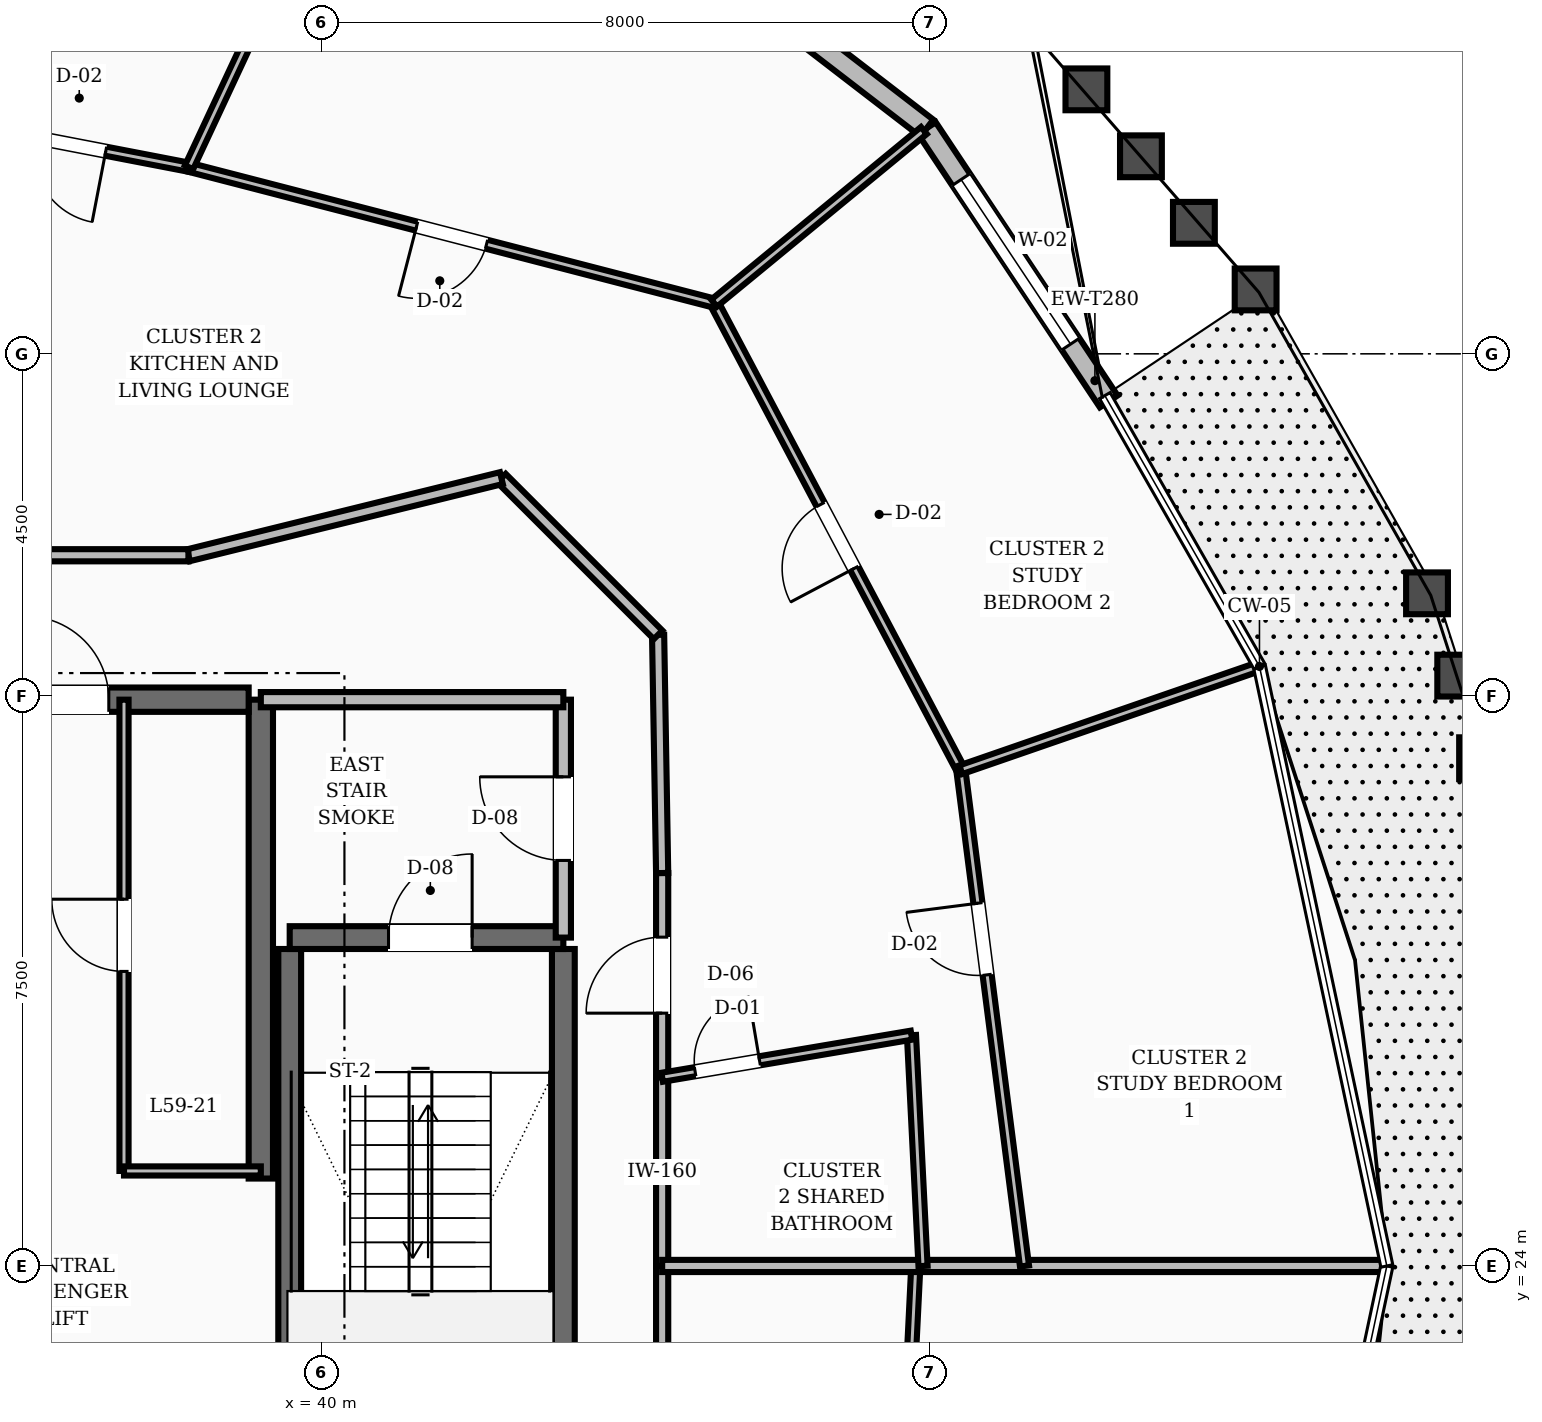
"""IFC4 building model, lengths in metres.
Left out: names, types, materials, properties, quantities, classifications, styles, units other than length and angle.
Written with IfcOpenShell. Run it as: python <this file> out.ifc"""

import sys

from ifc_helpers import new_model, si_unit, direction, frame, frame_2d, origin, place, context, subcontext, project, spatial, rectangle, extrude, element, fill, save


model = new_model("IFC4")
c1 = context("Model", 3, precision=1e-05, world=origin(), true_north=direction((0.0, 1.0)))
c2 = subcontext(c1, "Body", "Model", "MODEL_VIEW")
j1 = project(units=[si_unit("LENGTHUNIT", "METRE"), si_unit("PLANEANGLEUNIT", "RADIAN")], contexts=[c1])
p1 = place(None, origin())
s1 = spatial("IfcSite", under=j1, at=p1, CompositionType="ELEMENT")
p2 = place(p1, origin())
s2 = spatial("IfcBuilding", under=s1, at=p2, CompositionType="ELEMENT")
p3 = place(p2, frame((0.0, 0.0, 229.2)))
s3 = spatial("IfcBuildingStorey", under=s2, at=p3, CompositionType="ELEMENT", Elevation=229.2)
p4 = place(p3, frame((39.2, 25.15, 0.0), z_axis=(0.0, 0.0, 1.0), x_axis=(0.0, 1.0, 0.0)))
e1 = element("IfcWall", 1, at=p4, inside=s3, PredefinedType="SHEAR", context=c2, shape_type="SweptSolid", body=[
    extrude(rectangle(XDim=6.3, YDim=0.32, at=frame_2d((3.15, 0.0))), origin(), (0.0, 0.0, 1.0), 3.6),
])
p5 = place(p3, frame((35.8, 31.45, 0.0), z_axis=(0.0, 0.0, 1.0), x_axis=(1.0, 0.0, 0.0)))
e2 = element("IfcWall", 2, at=p5, inside=s3, PredefinedType="SHEAR", context=c2, shape_type="SweptSolid", body=[
    extrude(rectangle(XDim=3.24, YDim=0.32, at=frame_2d((1.62, 0.0))), origin(), (0.0, 0.0, 1.0), 3.6),
])
p6 = place(p5, frame((0.3, 0.0, 0.0)))
e3 = element("IfcOpeningElement", 3, at=p6, cuts=e2, PredefinedType="OPENING", context=c2, shape_type="SweptSolid", body=[
    extrude(rectangle(XDim=1.1, YDim=2.1, at=frame_2d((0.55, 1.05))), frame((0.0, 0.17, 0.0), z_axis=(0.0, -1.0, 0.0), x_axis=(1.0, 0.0, 0.0)), (0.0, 0.0, 1.0), 0.34),
])
for number, where, z_axis, x_axis in (
    (4, (43.18, 19.43, 0.0), (0.0, 0.0, 1.0), (0.0, 1.0, 0.0)),
    (5, (39.58, 19.43, 0.0), (0.0, 0.0, 1.0), (0.0, 1.0, 0.0)),
):
    element("IfcWall", number, at=place(p3, frame(where, z_axis=z_axis, x_axis=x_axis)), inside=s3, PredefinedType="SHEAR", context=c2, shape_type="SweptSolid", body=[
        extrude(rectangle(XDim=8.74, YDim=0.3, at=frame_2d((4.37, 0.0))), origin(), (0.0, 0.0, 1.0), 3.6),
    ])
p7 = place(p3, frame((39.58, 28.32, 0.0), z_axis=(0.0, 0.0, 1.0), x_axis=(1.0, 0.0, 0.0)))
e6 = element("IfcWall", 6, at=p7, inside=s3, PredefinedType="SHEAR", context=c2, shape_type="SweptSolid", body=[
    extrude(rectangle(XDim=3.6, YDim=0.3, at=frame_2d((1.8, 0.0))), origin(), (0.0, 0.0, 1.0), 3.6),
])
p8 = place(p7, frame((1.3, 0.0, 0.0)))
e7 = element("IfcOpeningElement", 7, at=p8, cuts=e6, PredefinedType="OPENING", context=c2, shape_type="SweptSolid", body=[
    extrude(rectangle(XDim=1.1, YDim=2.1, at=frame_2d((0.55, 1.05))), frame((0.0, 0.16, 0.0), z_axis=(0.0, -1.0, 0.0), x_axis=(1.0, 0.0, 0.0)), (0.0, 0.0, 1.0), 0.32),
])
p9 = place(p3, frame((50.355, 35.374, 0.0), z_axis=(0.0, 0.0, 1.0), x_axis=(-0.553982581877, 0.832528257164, 0.0)))
e8 = element("IfcWall", 8, at=p9, inside=s3, PredefinedType="STANDARD", context=c2, shape_type="SweptSolid", body=[
    extrude(rectangle(XDim=4.319, YDim=0.28, at=frame_2d((2.16, 0.0))), origin(), (0.0, 0.0, 1.0), 2.88),
])
p10 = place(p9, frame((0.906, 0.0, 0.8)))
e9 = element("IfcOpeningElement", 9, at=p10, cuts=e8, PredefinedType="OPENING", context=c2, shape_type="SweptSolid", body=[
    extrude(rectangle(XDim=2.6, YDim=1.65, at=frame_2d((1.3, 0.825))), frame((0.0, 0.15, 0.0), z_axis=(0.0, -1.0, 0.0), x_axis=(1.0, 0.0, 0.0)), (0.0, 0.0, 1.0), 0.3),
])
p11 = place(p3, frame((47.962, 38.97, 0.0), z_axis=(0.0, 0.0, 1.0), x_axis=(-0.792451546341, 0.609934870869, 0.0)))
e10 = element("IfcWall", 10, at=p11, inside=s3, PredefinedType="STANDARD", context=c2, shape_type="SweptSolid", body=[
    extrude(rectangle(XDim=4.317, YDim=0.28, at=frame_2d((2.158, 0.0))), origin(), (0.0, 0.0, 1.0), 2.88),
])
p12 = place(p3, frame((43.18, 28.32, 0.0), z_axis=(0.0, 0.0, 1.0), x_axis=(0.0, 1.0, 0.0)))
e11 = element("IfcWall", 11, at=p12, inside=s3, PredefinedType="SOLIDWALL", context=c2, shape_type="SweptSolid", body=[
    extrude(rectangle(XDim=3.13, YDim=0.2, at=frame_2d((1.565, 0.0))), origin(), (0.0, 0.0, 1.0), 2.87),
])
p13 = place(p12, frame((1.015, 0.0, 0.0)))
e12 = element("IfcOpeningElement", 12, at=p13, cuts=e11, PredefinedType="OPENING", context=c2, shape_type="SweptSolid", body=[
    extrude(rectangle(XDim=1.1, YDim=2.1, at=frame_2d((0.55, 1.05))), frame((0.0, 0.11, 0.0), z_axis=(0.0, -1.0, 0.0), x_axis=(1.0, 0.0, 0.0)), (0.0, 0.0, 1.0), 0.22),
])
p14 = place(p3, frame((39.2, 31.45, 0.0), z_axis=(0.0, 0.0, 1.0), x_axis=(1.0, 0.0, 0.0)))
e13 = element("IfcWall", 13, at=p14, inside=s3, PredefinedType="SOLIDWALL", context=c2, shape_type="SweptSolid", body=[
    extrude(rectangle(XDim=3.98, YDim=0.2, at=frame_2d((1.99, 0.0))), origin(), (0.0, 0.0, 1.0), 2.87),
])
p15 = place(p3, frame((37.4, 25.25, 0.0), z_axis=(0.0, 0.0, 1.0), x_axis=(0.0, 1.0, 0.0)))
e14 = element("IfcWall", 14, at=p15, inside=s3, PredefinedType="PARTITIONING", context=c2, shape_type="SweptSolid", body=[
    extrude(rectangle(XDim=6.2, YDim=0.12, at=frame_2d((3.1, 0.0))), origin(), (0.0, 0.0, 1.0), 2.87),
])
p16 = place(p15, frame((2.625, 0.0, 0.0)))
e15 = element("IfcOpeningElement", 15, at=p16, cuts=e14, PredefinedType="OPENING", context=c2, shape_type="SweptSolid", body=[
    extrude(rectangle(XDim=0.95, YDim=2.1, at=frame_2d((0.475, 1.05))), frame((0.0, 0.07, 0.0), z_axis=(0.0, -1.0, 0.0), x_axis=(1.0, 0.0, 0.0)), (0.0, 0.0, 1.0), 0.14),
])
p17 = place(p3, frame((37.4, 25.25, 0.0), z_axis=(0.0, 0.0, 1.0), x_axis=(1.0, 0.0, 0.0)))
e16 = element("IfcWall", 16, at=p17, inside=s3, PredefinedType="PARTITIONING", context=c2, shape_type="SweptSolid", body=[
    extrude(rectangle(XDim=1.8, YDim=0.12, at=frame_2d((0.9, 0.0))), origin(), (0.0, 0.0, 1.0), 2.87),
])
p18 = place(p3, frame((44.48, 24.0, 0.0), z_axis=(0.0, 0.0, 1.0), x_axis=(0.0, 1.0, 0.0)))
e17 = element("IfcWall", 17, at=p18, inside=s3, PredefinedType="SOLIDWALL", context=c2, shape_type="SweptSolid", body=[
    extrude(rectangle(XDim=2.482, YDim=0.16, at=frame_2d((1.241, 0.0))), origin(), (0.0, 0.0, 1.0), 2.87),
])
p19 = place(p3, frame((44.48, 26.482, 0.0), z_axis=(0.0, 0.0, 1.0), x_axis=(0.0, 1.0, 0.0)))
e18 = element("IfcWall", 18, at=p19, inside=s3, PredefinedType="SOLIDWALL", context=c2, shape_type="SweptSolid", body=[
    extrude(rectangle(XDim=2.687, YDim=0.16, at=frame_2d((1.344, 0.0))), origin(), (0.0, 0.0, 1.0), 2.87),
])
p20 = place(p19, frame((0.844, 0.0, 0.0)))
e19 = element("IfcOpeningElement", 19, at=p20, cuts=e18, PredefinedType="OPENING", context=c2, shape_type="SweptSolid", body=[
    extrude(rectangle(XDim=1.0, YDim=2.1, at=frame_2d((0.5, 1.05))), frame((0.0, 0.09, 0.0), z_axis=(0.0, -1.0, 0.0), x_axis=(1.0, 0.0, 0.0)), (0.0, 0.0, 1.0), 0.18),
])
p21 = place(p3, frame((44.48, 29.169, 0.0), z_axis=(0.0, 0.0, 1.0), x_axis=(-0.016981035134, 0.999855811828, 0.0)))
e20 = element("IfcWall", 20, at=p21, inside=s3, PredefinedType="SOLIDWALL", context=c2, shape_type="SweptSolid", body=[
    extrude(rectangle(XDim=3.134, YDim=0.16, at=frame_2d((1.567, 0.0))), origin(), (0.0, 0.0, 1.0), 2.87),
])
p22 = place(p3, frame((44.427, 32.303, 0.0), z_axis=(0.0, 0.0, 1.0), x_axis=(-0.707106781187, 0.707106781187, 0.0)))
e21 = element("IfcWall", 21, at=p22, inside=s3, PredefinedType="SOLIDWALL", context=c2, shape_type="SweptSolid", body=[
    extrude(rectangle(XDim=2.916, YDim=0.16, at=frame_2d((1.458, 0.0))), origin(), (0.0, 0.0, 1.0), 2.87),
])
p23 = place(p3, frame((42.365, 34.365, 0.0), z_axis=(0.0, 0.0, 1.0), x_axis=(-0.970939799552, -0.239323850978, 0.0)))
e22 = element("IfcWall", 22, at=p23, inside=s3, PredefinedType="SOLIDWALL", context=c2, shape_type="SweptSolid", body=[
    extrude(rectangle(XDim=4.241, YDim=0.16, at=frame_2d((2.12, 0.0))), origin(), (0.0, 0.0, 1.0), 2.87),
])
p24 = place(p3, frame((38.248, 33.35, 0.0), z_axis=(0.0, 0.0, 1.0), x_axis=(-1.0, 0.0, 0.0)))
e23 = element("IfcWall", 23, at=p24, inside=s3, PredefinedType="SOLIDWALL", context=c2, shape_type="SweptSolid", body=[
    extrude(rectangle(XDim=2.375, YDim=0.16, at=frame_2d((1.188, 0.0))), origin(), (0.0, 0.0, 1.0), 2.87),
])
p25 = place(p3, frame((44.48, 21.518, 0.0), z_axis=(0.0, 0.0, 1.0), x_axis=(0.0, 1.0, 0.0)))
e24 = element("IfcWall", 24, at=p25, inside=s3, PredefinedType="SOLIDWALL", context=c2, shape_type="SweptSolid", body=[
    extrude(rectangle(XDim=2.482, YDim=0.16, at=frame_2d((1.241, 0.0))), origin(), (0.0, 0.0, 1.0), 2.87),
])
p26 = place(p3, frame((47.669, 20.979, 0.0), z_axis=(0.0, 0.0, 1.0), x_axis=(0.048995554465, 0.998798996617, 0.0)))
e25 = element("IfcWall", 25, at=p26, inside=s3, PredefinedType="PARTITIONING", context=c2, shape_type="SweptSolid", body=[
    extrude(rectangle(XDim=3.025, YDim=0.12, at=frame_2d((1.512, 0.0))), origin(), (0.0, 0.0, 1.0), 2.87),
])
p27 = place(p3, frame((44.48, 24.0, 0.0), z_axis=(0.0, 0.0, 1.0), x_axis=(1.0, 0.0, 0.0)))
e26 = element("IfcWall", 26, at=p27, inside=s3, PredefinedType="SOLIDWALL", context=c2, shape_type="SweptSolid", body=[
    extrude(rectangle(XDim=9.484, YDim=0.16, at=frame_2d((4.742, 0.0))), origin(), (0.0, 0.0, 1.0), 2.87),
])
p28 = place(p3, frame((47.912, 24.0, 0.0), z_axis=(0.0, 0.0, 1.0), x_axis=(-0.050029736668, 0.998747728633, 0.0)))
e27 = element("IfcWall", 27, at=p28, inside=s3, PredefinedType="PARTITIONING", context=c2, shape_type="SweptSolid", body=[
    extrude(rectangle(XDim=3.04, YDim=0.12, at=frame_2d((1.52, 0.0))), origin(), (0.0, 0.0, 1.0), 2.87),
])
p29 = place(p3, frame((44.48, 26.482, 0.0), z_axis=(0.0, 0.0, 1.0), x_axis=(0.986036559249, 0.166528987937, 0.0)))
e28 = element("IfcWall", 28, at=p29, inside=s3, PredefinedType="PARTITIONING", context=c2, shape_type="SweptSolid", body=[
    extrude(rectangle(XDim=3.326, YDim=0.12, at=frame_2d((1.663, 0.0))), origin(), (0.0, 0.0, 1.0), 2.87),
])
p30 = place(p29, frame((0.44, 0.0, 0.0)))
e29 = element("IfcOpeningElement", 29, at=p30, cuts=e28, PredefinedType="OPENING", context=c2, shape_type="SweptSolid", body=[
    extrude(rectangle(XDim=0.86, YDim=2.1, at=frame_2d((0.43, 1.05))), frame((0.0, 0.07, 0.0), z_axis=(0.0, -1.0, 0.0), x_axis=(1.0, 0.0, 0.0)), (0.0, 0.0, 1.0), 0.14),
])
p31 = place(p3, frame((49.247, 24.0, 0.0), z_axis=(0.0, 0.0, 1.0), x_axis=(-0.12730280127, 0.991863900336, 0.0)))
e30 = element("IfcWall", 30, at=p31, inside=s3, PredefinedType="PARTITIONING", context=c2, shape_type="SweptSolid", body=[
    extrude(rectangle(XDim=6.582, YDim=0.12, at=frame_2d((3.291, 0.0))), origin(), (0.0, 0.0, 1.0), 2.87),
])
p32 = place(p31, frame((3.861, 0.0, 0.0)))
e31 = element("IfcOpeningElement", 31, at=p32, cuts=e30, PredefinedType="OPENING", context=c2, shape_type="SweptSolid", body=[
    extrude(rectangle(XDim=0.95, YDim=2.1, at=frame_2d((0.475, 1.05))), frame((0.0, 0.07, 0.0), z_axis=(0.0, -1.0, 0.0), x_axis=(1.0, 0.0, 0.0)), (0.0, 0.0, 1.0), 0.14),
])
p33 = place(p3, frame((48.409, 30.528, 0.0), z_axis=(0.0, 0.0, 1.0), x_axis=(-0.467391727561, 0.884050322667, 0.0)))
e32 = element("IfcWall", 32, at=p33, inside=s3, PredefinedType="PARTITIONING", context=c2, shape_type="SweptSolid", body=[
    extrude(rectangle(XDim=6.944, YDim=0.12, at=frame_2d((3.472, 0.0))), origin(), (0.0, 0.0, 1.0), 2.87),
])
p34 = place(p33, frame((2.997, 0.0, 0.0)))
e33 = element("IfcOpeningElement", 33, at=p34, cuts=e32, PredefinedType="OPENING", context=c2, shape_type="SweptSolid", body=[
    extrude(rectangle(XDim=0.95, YDim=2.1, at=frame_2d((0.475, 1.05))), frame((0.0, 0.07, 0.0), z_axis=(0.0, -1.0, 0.0), x_axis=(1.0, 0.0, 0.0)), (0.0, 0.0, 1.0), 0.14),
])
p35 = place(p3, frame((48.409, 30.528, 0.0), z_axis=(0.0, 0.0, 1.0), x_axis=(0.945075078679, 0.326853324381, 0.0)))
e34 = element("IfcWall", 34, at=p35, inside=s3, PredefinedType="PARTITIONING", context=c2, shape_type="SweptSolid", body=[
    extrude(rectangle(XDim=4.107, YDim=0.12, at=frame_2d((2.054, 0.0))), origin(), (0.0, 0.0, 1.0), 2.87),
])
p36 = place(p3, frame((45.164, 36.667, 0.0), z_axis=(0.0, 0.0, 1.0), x_axis=(-0.968125457117, 0.250465764689, 0.0)))
e35 = element("IfcWall", 35, at=p36, inside=s3, PredefinedType="PARTITIONING", context=c2, shape_type="SweptSolid", body=[
    extrude(rectangle(XDim=7.135, YDim=0.12, at=frame_2d((3.568, 0.0))), origin(), (0.0, 0.0, 1.0), 2.87),
])
p37 = place(p36, frame((3.093, 0.0, 0.0)))
e36 = element("IfcOpeningElement", 36, at=p37, cuts=e35, PredefinedType="OPENING", context=c2, shape_type="SweptSolid", body=[
    extrude(rectangle(XDim=0.95, YDim=2.1, at=frame_2d((0.475, 1.05))), frame((0.0, 0.07, 0.0), z_axis=(0.0, -1.0, 0.0), x_axis=(1.0, 0.0, 0.0)), (0.0, 0.0, 1.0), 0.14),
])
p38 = place(p3, frame((45.164, 36.667, 0.0), z_axis=(0.0, 0.0, 1.0), x_axis=(0.772231834488, 0.635340848525, 0.0)))
e37 = element("IfcWall", 37, at=p38, inside=s3, PredefinedType="PARTITIONING", context=c2, shape_type="SweptSolid", body=[
    extrude(rectangle(XDim=3.574, YDim=0.12, at=frame_2d((1.787, 0.0))), origin(), (0.0, 0.0, 1.0), 2.87),
])
p39 = place(p3, frame((38.256, 38.454, 0.0), z_axis=(0.0, 0.0, 1.0), x_axis=(-0.981903403817, 0.189382432059, 0.0)))
e38 = element("IfcWall", 38, at=p39, inside=s3, PredefinedType="PARTITIONING", context=c2, shape_type="SweptSolid", body=[
    extrude(rectangle(XDim=3.182, YDim=0.12, at=frame_2d((1.591, 0.0))), origin(), (0.0, 0.0, 1.0), 2.87),
])
p40 = place(p39, frame((1.116, 0.0, 0.0)))
e39 = element("IfcOpeningElement", 39, at=p40, cuts=e38, PredefinedType="OPENING", context=c2, shape_type="SweptSolid", body=[
    extrude(rectangle(XDim=0.95, YDim=2.1, at=frame_2d((0.475, 1.05))), frame((0.0, 0.07, 0.0), z_axis=(0.0, -1.0, 0.0), x_axis=(1.0, 0.0, 0.0)), (0.0, 0.0, 1.0), 0.14),
])
p41 = place(p3, frame((38.256, 38.454, 0.0), z_axis=(0.0, 0.0, 1.0), x_axis=(0.422983612083, 0.906137331705, 0.0)))
e40 = element("IfcWall", 40, at=p41, inside=s3, PredefinedType="PARTITIONING", context=c2, shape_type="SweptSolid", body=[
    extrude(rectangle(XDim=5.583, YDim=0.12, at=frame_2d((2.792, 0.0))), origin(), (0.0, 0.0, 1.0), 2.87),
])
p42 = place(p3, frame((33.86, 33.35, 0.0), z_axis=(0.0, 0.0, 1.0), x_axis=(0.217565376415, 0.976045750457, 0.0)))
e41 = element("IfcWall", 41, at=p42, inside=s3, PredefinedType="SOLIDWALL", context=c2, shape_type="SweptSolid", body=[
    extrude(rectangle(XDim=11.643, YDim=0.16, at=frame_2d((5.822, 0.0))), origin(), (0.0, 0.0, 1.0), 2.87),
])
p43 = place(p10, origin())
e42 = element("IfcWindow", 42, at=p43, inside=s3, PartitioningType="SINGLE_PANEL", PredefinedType="WINDOW", context=c2, shape_type="SweptSolid", body=[
    extrude(rectangle(XDim=2.6, YDim=1.65, at=frame_2d((1.3, 0.825))), frame((0.0, 0.03, 0.0), z_axis=(0.0, -1.0, 0.0), x_axis=(1.0, 0.0, 0.0)), (0.0, 0.0, 1.0), 0.06),
])
fill(e9, e42)
p44 = place(p8, origin())
e43 = element("IfcDoor", 43, at=p44, inside=s3, OperationType="SINGLE_SWING_RIGHT", PredefinedType="DOOR", context=c2, shape_type="SweptSolid", body=[
    extrude(rectangle(XDim=1.1, YDim=2.1, at=frame_2d((0.55, 1.05))), frame((0.0, 0.025, 0.0), z_axis=(0.0, -1.0, 0.0), x_axis=(1.0, 0.0, 0.0)), (0.0, 0.0, 1.0), 0.05),
])
fill(e7, e43)
p45 = place(p13, origin())
e44 = element("IfcDoor", 44, at=p45, inside=s3, OperationType="SINGLE_SWING_RIGHT", PredefinedType="DOOR", context=c2, shape_type="SweptSolid", body=[
    extrude(rectangle(XDim=1.1, YDim=2.1, at=frame_2d((0.55, 1.05))), frame((0.0, 0.025, 0.0), z_axis=(0.0, -1.0, 0.0), x_axis=(1.0, 0.0, 0.0)), (0.0, 0.0, 1.0), 0.05),
])
fill(e12, e44)
p46 = place(p6, origin())
e45 = element("IfcDoor", 45, at=p46, inside=s3, OperationType="SINGLE_SWING_LEFT", PredefinedType="DOOR", context=c2, shape_type="SweptSolid", body=[
    extrude(rectangle(XDim=1.1, YDim=2.1, at=frame_2d((0.55, 1.05))), frame((0.0, 0.025, 0.0), z_axis=(0.0, -1.0, 0.0), x_axis=(1.0, 0.0, 0.0)), (0.0, 0.0, 1.0), 0.05),
])
fill(e3, e45)
p47 = place(p16, origin())
e46 = element("IfcDoor", 46, at=p47, inside=s3, OperationType="SINGLE_SWING_RIGHT", PredefinedType="DOOR", context=c2, shape_type="SweptSolid", body=[
    extrude(rectangle(XDim=0.95, YDim=2.1, at=frame_2d((0.475, 1.05))), frame((0.0, 0.025, 0.0), z_axis=(0.0, -1.0, 0.0), x_axis=(1.0, 0.0, 0.0)), (0.0, 0.0, 1.0), 0.05),
])
fill(e15, e46)
p48 = place(p30, origin())
e47 = element("IfcDoor", 47, at=p48, inside=s3, OperationType="SINGLE_SWING_RIGHT", PredefinedType="DOOR", context=c2, shape_type="SweptSolid", body=[
    extrude(rectangle(XDim=0.86, YDim=2.1, at=frame_2d((0.43, 1.05))), frame((0.0, 0.025, 0.0), z_axis=(0.0, -1.0, 0.0), x_axis=(1.0, 0.0, 0.0)), (0.0, 0.0, 1.0), 0.05),
])
fill(e29, e47)
p49 = place(p20, origin())
e48 = element("IfcDoor", 48, at=p49, inside=s3, OperationType="SINGLE_SWING_LEFT", PredefinedType="DOOR", context=c2, shape_type="SweptSolid", body=[
    extrude(rectangle(XDim=1.0, YDim=2.1, at=frame_2d((0.5, 1.05))), frame((0.0, 0.025, 0.0), z_axis=(0.0, -1.0, 0.0), x_axis=(1.0, 0.0, 0.0)), (0.0, 0.0, 1.0), 0.05),
])
fill(e19, e48)
p50 = place(p32, origin())
e49 = element("IfcDoor", 49, at=p50, inside=s3, OperationType="SINGLE_SWING_RIGHT", PredefinedType="DOOR", context=c2, shape_type="SweptSolid", body=[
    extrude(rectangle(XDim=0.95, YDim=2.1, at=frame_2d((0.475, 1.05))), frame((0.0, 0.025, 0.0), z_axis=(0.0, -1.0, 0.0), x_axis=(1.0, 0.0, 0.0)), (0.0, 0.0, 1.0), 0.05),
])
fill(e31, e49)
p51 = place(p34, origin())
e50 = element("IfcDoor", 50, at=p51, inside=s3, OperationType="SINGLE_SWING_LEFT", PredefinedType="DOOR", context=c2, shape_type="SweptSolid", body=[
    extrude(rectangle(XDim=0.95, YDim=2.1, at=frame_2d((0.475, 1.05))), frame((0.0, 0.025, 0.0), z_axis=(0.0, -1.0, 0.0), x_axis=(1.0, 0.0, 0.0)), (0.0, 0.0, 1.0), 0.05),
])
fill(e33, e50)
p52 = place(p37, origin())
e51 = element("IfcDoor", 51, at=p52, inside=s3, OperationType="SINGLE_SWING_RIGHT", PredefinedType="DOOR", context=c2, shape_type="SweptSolid", body=[
    extrude(rectangle(XDim=0.95, YDim=2.1, at=frame_2d((0.475, 1.05))), frame((0.0, 0.025, 0.0), z_axis=(0.0, -1.0, 0.0), x_axis=(1.0, 0.0, 0.0)), (0.0, 0.0, 1.0), 0.05),
])
fill(e36, e51)
p53 = place(p40, origin())
e52 = element("IfcDoor", 52, at=p53, inside=s3, OperationType="SINGLE_SWING_LEFT", PredefinedType="DOOR", context=c2, shape_type="SweptSolid", body=[
    extrude(rectangle(XDim=0.95, YDim=2.1, at=frame_2d((0.475, 1.05))), frame((0.0, 0.025, 0.0), z_axis=(0.0, -1.0, 0.0), x_axis=(1.0, 0.0, 0.0)), (0.0, 0.0, 1.0), 0.05),
])
fill(e39, e52)
save(model, sys.argv[1])
